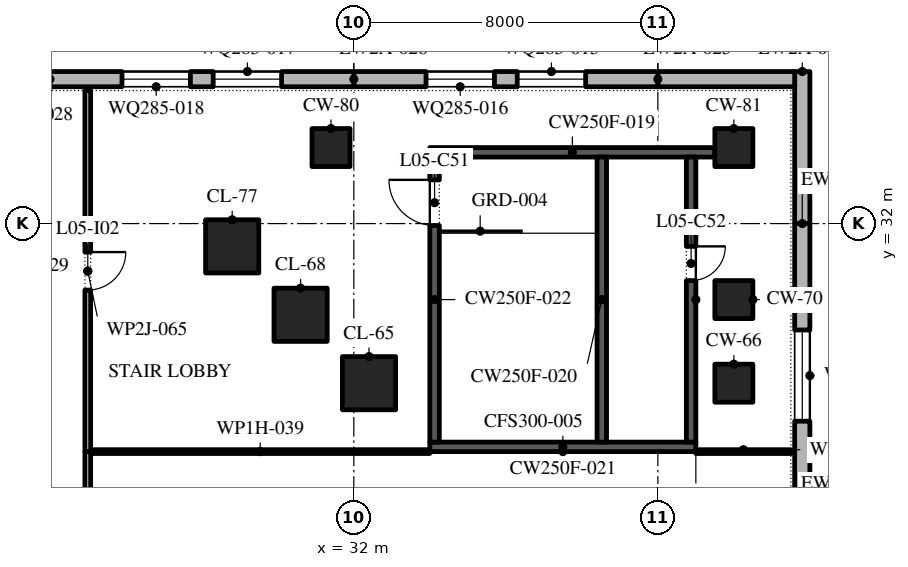
"""IFC4 building model, lengths in metres.
Left out: names, types, materials, properties, quantities, classifications, styles, units other than length and angle.
Written with IfcOpenShell. Run it as: python <this file> out.ifc"""

import sys

from ifc_helpers import new_model, si_unit, direction, frame, frame_2d, origin, origin_2d, place, context, subcontext, project, spatial, polyline, rectangle, outline, extrude, element, fill, save


model = new_model("IFC4")
c1 = context("Model", 3, precision=1e-05, world=origin(), true_north=direction((0.0, 1.0)))
c2 = subcontext(c1, "Body", "Model", "MODEL_VIEW")
j1 = project(units=[si_unit("LENGTHUNIT", "METRE"), si_unit("PLANEANGLEUNIT", "RADIAN")], contexts=[c1])
p1 = place(None, origin())
s1 = spatial("IfcSite", under=j1, at=p1, CompositionType="ELEMENT")
p2 = place(p1, origin())
s2 = spatial("IfcBuilding", under=s1, at=p2, CompositionType="ELEMENT")
p3 = place(p2, frame((0.0, 0.0, 28.8)))
s3 = spatial("IfcBuildingStorey", under=s2, at=p3, CompositionType="ELEMENT", Elevation=28.8)
p4 = place(p3, frame((32.4, 27.8, 0.0), z_axis=(0.0, 0.0, 1.0), x_axis=(1.0, 0.0, 0.0)))
e1 = element("IfcColumn", 1, at=p4, inside=s3, PredefinedType="COLUMN", context=c2, shape_type="SweptSolid", body=[
    extrude(rectangle(XDim=1.4, YDim=1.4, at=origin_2d()), origin(), (0.0, 0.0, 1.0), 4.8),
])
p5 = place(p3, frame((42.0, 27.8, 0.0), z_axis=(0.0, 0.0, 1.0), x_axis=(1.0, 0.0, 0.0)))
e2 = element("IfcColumn", 2, at=p5, inside=s3, PredefinedType="COLUMN", context=c2, shape_type="SweptSolid", body=[
    extrude(rectangle(XDim=1.0, YDim=1.0, at=origin_2d()), origin(), (0.0, 0.0, 1.0), 4.35),
])
p6 = place(p3, frame((30.6, 29.6, 0.0), z_axis=(0.0, 0.0, 1.0), x_axis=(1.0, 0.0, 0.0)))
e3 = element("IfcColumn", 3, at=p6, inside=s3, PredefinedType="COLUMN", context=c2, shape_type="SweptSolid", body=[
    extrude(rectangle(XDim=1.4, YDim=1.4, at=origin_2d()), origin(), (0.0, 0.0, 1.0), 4.8),
])
p7 = place(p3, frame((42.0, 30.0, 0.0), z_axis=(0.0, 0.0, 1.0), x_axis=(1.0, 0.0, 0.0)))
e4 = element("IfcColumn", 4, at=p7, inside=s3, PredefinedType="COLUMN", context=c2, shape_type="SweptSolid", body=[
    extrude(rectangle(XDim=1.0, YDim=1.0, at=origin_2d()), origin(), (0.0, 0.0, 1.0), 4.35),
])
p8 = place(p3, frame((28.8, 31.4, 0.0), z_axis=(0.0, 0.0, 1.0), x_axis=(1.0, 0.0, 0.0)))
e5 = element("IfcColumn", 5, at=p8, inside=s3, PredefinedType="COLUMN", context=c2, shape_type="SweptSolid", body=[
    extrude(rectangle(XDim=1.4, YDim=1.4, at=origin_2d()), origin(), (0.0, 0.0, 1.0), 4.8),
])
for number, where, z_axis, x_axis in (
    (6, (31.4, 34.0, 0.0), (0.0, 0.0, 1.0), (1.0, 0.0, 0.0)),
    (7, (42.0, 34.0, 0.0), (0.0, 0.0, 1.0), (1.0, 0.0, 0.0)),
):
    element("IfcColumn", number, at=place(p3, frame(where, z_axis=z_axis, x_axis=x_axis)), inside=s3, PredefinedType="COLUMN", context=c2, shape_type="SweptSolid", body=[
        extrude(rectangle(XDim=1.0, YDim=1.0, at=origin_2d()), origin(), (0.0, 0.0, 1.0), 4.35),
    ])
p9 = place(p3, frame((43.8, 24.0, 0.0), z_axis=(0.0, 0.0, 1.0), x_axis=(0.0, 1.0, 0.0)))
e8 = element("IfcWall", 8, at=p9, inside=s3, PredefinedType="STANDARD", context=c2, shape_type="SweptSolid", body=[
    extrude(rectangle(XDim=8.0, YDim=0.4, at=frame_2d((4.0, 0.0))), origin(), (0.0, 0.0, 1.0), 4.35),
])
p10 = place(p9, frame((2.8, 0.0, 0.9)))
e9 = element("IfcOpeningElement", 9, at=p10, cuts=e8, PredefinedType="OPENING", context=c2, shape_type="SweptSolid", body=[
    extrude(outline(polyline([(0.0, 0.0), (2.4, 0.0), (2.4, 1.425), (2.378, 1.677), (2.312, 1.921), (2.205, 2.15), (2.06, 2.356), (1.881, 2.535), (1.674, 2.679), (1.444, 2.785), (1.2, 2.85), (0.956, 2.785), (0.726, 2.679), (0.519, 2.535), (0.34, 2.356), (0.195, 2.15), (0.088, 1.921), (0.022, 1.677), (0.0, 1.425), (0.0, 0.0)])), frame((0.0, 0.21, 0.0), z_axis=(0.0, -1.0, 0.0), x_axis=(1.0, 0.0, 0.0)), (0.0, 0.0, 1.0), 0.42),
])
p11 = place(p3, frame((43.8, 32.0, 0.0), z_axis=(0.0, 0.0, 1.0), x_axis=(0.0, 1.0, 0.0)))
e10 = element("IfcWall", 10, at=p11, inside=s3, PredefinedType="STANDARD", context=c2, shape_type="SweptSolid", body=[
    extrude(rectangle(XDim=4.0, YDim=0.4, at=frame_2d((2.0, 0.0))), origin(), (0.0, 0.0, 1.0), 4.35),
])
p12 = place(p3, frame((43.6, 35.8, 0.0), z_axis=(0.0, 0.0, 1.0), x_axis=(-1.0, 0.0, 0.0)))
e11 = element("IfcWall", 11, at=p12, inside=s3, PredefinedType="STANDARD", context=c2, shape_type="SweptSolid", body=[
    extrude(rectangle(XDim=3.6, YDim=0.4, at=frame_2d((1.8, 0.0))), origin(), (0.0, 0.0, 1.0), 4.35),
])
p13 = place(p3, frame((40.0, 35.8, 0.0), z_axis=(0.0, 0.0, 1.0), x_axis=(-1.0, 0.0, 0.0)))
e12 = element("IfcWall", 12, at=p13, inside=s3, PredefinedType="STANDARD", context=c2, shape_type="SweptSolid", body=[
    extrude(rectangle(XDim=8.0, YDim=0.4, at=frame_2d((4.0, 0.0))), origin(), (0.0, 0.0, 1.0), 4.35),
])
p14 = place(p13, frame((1.9, 0.0, 0.9)))
e13 = element("IfcOpeningElement", 13, at=p14, cuts=e12, PredefinedType="OPENING", context=c2, shape_type="SweptSolid", body=[
    extrude(outline(polyline([(0.0, 0.0), (1.8, 0.0), (1.8, 1.425), (1.784, 1.646), (1.738, 1.864), (1.661, 2.072), (1.556, 2.268), (1.425, 2.447), (1.269, 2.605), (1.093, 2.741), (0.9, 2.85), (0.707, 2.741), (0.531, 2.605), (0.375, 2.447), (0.244, 2.268), (0.139, 2.072), (0.062, 1.864), (0.016, 1.646), (0.0, 1.425), (0.0, 0.0)])), frame((0.0, 0.21, 0.0), z_axis=(0.0, -1.0, 0.0), x_axis=(1.0, 0.0, 0.0)), (0.0, 0.0, 1.0), 0.42),
])
p15 = place(p13, frame((4.3, 0.0, 0.9)))
e14 = element("IfcOpeningElement", 14, at=p15, cuts=e12, PredefinedType="OPENING", context=c2, shape_type="SweptSolid", body=[
    extrude(outline(polyline([(0.0, 0.0), (1.8, 0.0), (1.8, 1.425), (1.784, 1.646), (1.738, 1.864), (1.661, 2.072), (1.556, 2.268), (1.425, 2.447), (1.269, 2.605), (1.093, 2.741), (0.9, 2.85), (0.707, 2.741), (0.531, 2.605), (0.375, 2.447), (0.244, 2.268), (0.139, 2.072), (0.062, 1.864), (0.016, 1.646), (0.0, 1.425), (0.0, 0.0)])), frame((0.0, 0.21, 0.0), z_axis=(0.0, -1.0, 0.0), x_axis=(1.0, 0.0, 0.0)), (0.0, 0.0, 1.0), 0.42),
])
p16 = place(p3, frame((32.0, 35.8, 0.0), z_axis=(0.0, 0.0, 1.0), x_axis=(-1.0, 0.0, 0.0)))
e15 = element("IfcWall", 15, at=p16, inside=s3, PredefinedType="STANDARD", context=c2, shape_type="SweptSolid", body=[
    extrude(rectangle(XDim=8.0, YDim=0.4, at=frame_2d((4.0, 0.0))), origin(), (0.0, 0.0, 1.0), 4.35),
])
p17 = place(p16, frame((1.9, 0.0, 0.9)))
e16 = element("IfcOpeningElement", 16, at=p17, cuts=e15, PredefinedType="OPENING", context=c2, shape_type="SweptSolid", body=[
    extrude(outline(polyline([(0.0, 0.0), (1.8, 0.0), (1.8, 1.425), (1.784, 1.646), (1.738, 1.864), (1.661, 2.072), (1.556, 2.268), (1.425, 2.447), (1.269, 2.605), (1.093, 2.741), (0.9, 2.85), (0.707, 2.741), (0.531, 2.605), (0.375, 2.447), (0.244, 2.268), (0.139, 2.072), (0.062, 1.864), (0.016, 1.646), (0.0, 1.425), (0.0, 0.0)])), frame((0.0, 0.21, 0.0), z_axis=(0.0, -1.0, 0.0), x_axis=(1.0, 0.0, 0.0)), (0.0, 0.0, 1.0), 0.42),
])
p18 = place(p16, frame((4.3, 0.0, 0.9)))
e17 = element("IfcOpeningElement", 17, at=p18, cuts=e15, PredefinedType="OPENING", context=c2, shape_type="SweptSolid", body=[
    extrude(outline(polyline([(0.0, 0.0), (1.8, 0.0), (1.8, 1.425), (1.784, 1.646), (1.738, 1.864), (1.661, 2.072), (1.556, 2.268), (1.425, 2.447), (1.269, 2.605), (1.093, 2.741), (0.9, 2.85), (0.707, 2.741), (0.531, 2.605), (0.375, 2.447), (0.244, 2.268), (0.139, 2.072), (0.062, 1.864), (0.016, 1.646), (0.0, 1.425), (0.0, 0.0)])), frame((0.0, 0.21, 0.0), z_axis=(0.0, -1.0, 0.0), x_axis=(1.0, 0.0, 0.0)), (0.0, 0.0, 1.0), 0.42),
])
p19 = place(p3, frame((34.0, 26.125, 0.0), z_axis=(0.0, 0.0, 1.0), x_axis=(1.0, 0.0, 0.0)))
e18 = element("IfcWall", 18, at=p19, inside=s3, PredefinedType="SHEAR", context=c2, shape_type="SweptSolid", body=[
    extrude(rectangle(XDim=7.0, YDim=0.25, at=frame_2d((3.5, 0.0))), origin(), (0.0, 0.0, 1.0), 4.35),
])
p20 = place(p3, frame((34.0, 33.875, 0.0), z_axis=(0.0, 0.0, 1.0), x_axis=(1.0, 0.0, 0.0)))
e19 = element("IfcWall", 19, at=p20, inside=s3, PredefinedType="SHEAR", context=c2, shape_type="SweptSolid", body=[
    extrude(rectangle(XDim=7.5, YDim=0.25, at=frame_2d((3.75, 0.0))), origin(), (0.0, 0.0, 1.0), 4.35),
])
p21 = place(p3, frame((34.125, 26.25, 0.0), z_axis=(0.0, 0.0, 1.0), x_axis=(0.0, 1.0, 0.0)))
e20 = element("IfcWall", 20, at=p21, inside=s3, PredefinedType="SHEAR", context=c2, shape_type="SweptSolid", body=[
    extrude(rectangle(XDim=7.5, YDim=0.25, at=frame_2d((3.75, 0.0))), origin(), (0.0, 0.0, 1.0), 4.35),
])
p22 = place(p21, frame((5.7, 0.0, 0.0)))
e21 = element("IfcOpeningElement", 21, at=p22, cuts=e20, PredefinedType="OPENING", context=c2, shape_type="SweptSolid", body=[
    extrude(rectangle(XDim=1.2, YDim=2.1, at=frame_2d((0.6, 1.05))), frame((0.0, 0.135, 0.0), z_axis=(0.0, -1.0, 0.0), x_axis=(1.0, 0.0, 0.0)), (0.0, 0.0, 1.0), 0.27),
])
p23 = place(p3, frame((40.875, 26.25, 0.0), z_axis=(0.0, 0.0, 1.0), x_axis=(0.0, 1.0, 0.0)))
e22 = element("IfcWall", 22, at=p23, inside=s3, PredefinedType="SHEAR", context=c2, shape_type="SweptSolid", body=[
    extrude(rectangle(XDim=7.5, YDim=0.25, at=frame_2d((3.75, 0.0))), origin(), (0.0, 0.0, 1.0), 4.35),
])
p24 = place(p23, frame((4.25, 0.0, 0.0)))
e23 = element("IfcOpeningElement", 23, at=p24, cuts=e22, PredefinedType="OPENING", context=c2, shape_type="SweptSolid", body=[
    extrude(rectangle(XDim=0.9, YDim=2.1, at=frame_2d((0.45, 1.05))), frame((0.0, 0.135, 0.0), z_axis=(0.0, -1.0, 0.0), x_axis=(1.0, 0.0, 0.0)), (0.0, 0.0, 1.0), 0.27),
])
p25 = place(p3, frame((38.525, 26.25, 0.0), z_axis=(0.0, 0.0, 1.0), x_axis=(0.0, 1.0, 0.0)))
e24 = element("IfcWall", 24, at=p25, inside=s3, PredefinedType="SHEAR", context=c2, shape_type="SweptSolid", body=[
    extrude(rectangle(XDim=7.5, YDim=0.25, at=frame_2d((3.75, 0.0))), origin(), (0.0, 0.0, 1.0), 4.35),
])
p26 = place(p3, frame((25.075, 26.0, 0.0), z_axis=(0.0, 0.0, 1.0), x_axis=(1.0, 0.0, 0.0)))
e25 = element("IfcWall", 25, at=p26, inside=s3, PredefinedType="PARTITIONING", context=c2, shape_type="SweptSolid", body=[
    extrude(rectangle(XDim=8.925, YDim=0.1, at=frame_2d((4.462, 0.0))), origin(), (0.0, 0.0, 1.0), 4.35),
])
p27 = place(p3, frame((41.0, 26.0, 0.0), z_axis=(0.0, 0.0, 1.0), x_axis=(1.0, 0.0, 0.0)))
e26 = element("IfcWall", 26, at=p27, inside=s3, PredefinedType="PARTITIONING", context=c2, shape_type="SweptSolid", body=[
    extrude(rectangle(XDim=2.5, YDim=0.1, at=frame_2d((1.25, 0.0))), origin(), (0.0, 0.0, 1.0), 4.35),
])
p28 = place(p3, frame((25.0, 12.5, 0.0), z_axis=(0.0, 0.0, 1.0), x_axis=(0.0, 1.0, 0.0)))
e27 = element("IfcWall", 27, at=p28, inside=s3, PredefinedType="PARTITIONING", context=c2, shape_type="SweptSolid", body=[
    extrude(rectangle(XDim=13.5, YDim=0.15, at=frame_2d((6.75, 0.0))), origin(), (0.0, 0.0, 1.0), 4.35),
])
p29 = place(p28, frame((5.85, 0.0, 0.0)))
e28 = element("IfcOpeningElement", 28, at=p29, cuts=e27, PredefinedType="OPENING", context=c2, shape_type="SweptSolid", body=[
    extrude(rectangle(XDim=1.8, YDim=2.1, at=frame_2d((0.9, 1.05))), frame((0.0, 0.085, 0.0), z_axis=(0.0, -1.0, 0.0), x_axis=(1.0, 0.0, 0.0)), (0.0, 0.0, 1.0), 0.17),
])
p30 = place(p3, frame((25.0, 26.0, 0.0), z_axis=(0.0, 0.0, 1.0), x_axis=(0.0, 1.0, 0.0)))
e29 = element("IfcWall", 29, at=p30, inside=s3, PredefinedType="PARTITIONING", context=c2, shape_type="SweptSolid", body=[
    extrude(rectangle(XDim=9.5, YDim=0.15, at=frame_2d((4.75, 0.0))), origin(), (0.0, 0.0, 1.0), 4.35),
])
p31 = place(p30, frame((4.25, 0.0, 0.0)))
e30 = element("IfcOpeningElement", 30, at=p31, cuts=e29, PredefinedType="OPENING", context=c2, shape_type="SweptSolid", body=[
    extrude(rectangle(XDim=1.0, YDim=2.1, at=frame_2d((0.5, 1.05))), frame((0.0, 0.085, 0.0), z_axis=(0.0, -1.0, 0.0), x_axis=(1.0, 0.0, 0.0)), (0.0, 0.0, 1.0), 0.17),
])
p32 = place(p10, origin())
e31 = element("IfcWindow", 31, at=p32, inside=s3, PartitioningType="DOUBLE_PANEL_VERTICAL", PredefinedType="WINDOW", context=c2, shape_type="SweptSolid", body=[
    extrude(outline(polyline([(0.0, 0.0), (2.4, 0.0), (2.4, 1.425), (2.378, 1.677), (2.312, 1.921), (2.205, 2.15), (2.06, 2.356), (1.881, 2.535), (1.674, 2.679), (1.444, 2.785), (1.2, 2.85), (0.956, 2.785), (0.726, 2.679), (0.519, 2.535), (0.34, 2.356), (0.195, 2.15), (0.088, 1.921), (0.022, 1.677), (0.0, 1.425), (0.0, 0.0)])), frame((0.0, 0.03, 0.0), z_axis=(0.0, -1.0, 0.0), x_axis=(1.0, 0.0, 0.0)), (0.0, 0.0, 1.0), 0.06),
])
fill(e9, e31)
p33 = place(p14, origin())
e32 = element("IfcWindow", 32, at=p33, inside=s3, PartitioningType="DOUBLE_PANEL_VERTICAL", PredefinedType="WINDOW", context=c2, shape_type="SweptSolid", body=[
    extrude(outline(polyline([(0.0, 0.0), (1.8, 0.0), (1.8, 1.425), (1.784, 1.646), (1.738, 1.864), (1.661, 2.072), (1.556, 2.268), (1.425, 2.447), (1.269, 2.605), (1.093, 2.741), (0.9, 2.85), (0.707, 2.741), (0.531, 2.605), (0.375, 2.447), (0.244, 2.268), (0.139, 2.072), (0.062, 1.864), (0.016, 1.646), (0.0, 1.425), (0.0, 0.0)])), frame((0.0, 0.03, 0.0), z_axis=(0.0, -1.0, 0.0), x_axis=(1.0, 0.0, 0.0)), (0.0, 0.0, 1.0), 0.06),
])
fill(e13, e32)
p34 = place(p15, origin())
e33 = element("IfcWindow", 33, at=p34, inside=s3, PartitioningType="DOUBLE_PANEL_VERTICAL", PredefinedType="WINDOW", context=c2, shape_type="SweptSolid", body=[
    extrude(outline(polyline([(0.0, 0.0), (1.8, 0.0), (1.8, 1.425), (1.784, 1.646), (1.738, 1.864), (1.661, 2.072), (1.556, 2.268), (1.425, 2.447), (1.269, 2.605), (1.093, 2.741), (0.9, 2.85), (0.707, 2.741), (0.531, 2.605), (0.375, 2.447), (0.244, 2.268), (0.139, 2.072), (0.062, 1.864), (0.016, 1.646), (0.0, 1.425), (0.0, 0.0)])), frame((0.0, 0.03, 0.0), z_axis=(0.0, -1.0, 0.0), x_axis=(1.0, 0.0, 0.0)), (0.0, 0.0, 1.0), 0.06),
])
fill(e14, e33)
p35 = place(p17, origin())
e34 = element("IfcWindow", 34, at=p35, inside=s3, PartitioningType="DOUBLE_PANEL_VERTICAL", PredefinedType="WINDOW", context=c2, shape_type="SweptSolid", body=[
    extrude(outline(polyline([(0.0, 0.0), (1.8, 0.0), (1.8, 1.425), (1.784, 1.646), (1.738, 1.864), (1.661, 2.072), (1.556, 2.268), (1.425, 2.447), (1.269, 2.605), (1.093, 2.741), (0.9, 2.85), (0.707, 2.741), (0.531, 2.605), (0.375, 2.447), (0.244, 2.268), (0.139, 2.072), (0.062, 1.864), (0.016, 1.646), (0.0, 1.425), (0.0, 0.0)])), frame((0.0, 0.03, 0.0), z_axis=(0.0, -1.0, 0.0), x_axis=(1.0, 0.0, 0.0)), (0.0, 0.0, 1.0), 0.06),
])
fill(e16, e34)
p36 = place(p18, origin())
e35 = element("IfcWindow", 35, at=p36, inside=s3, PartitioningType="DOUBLE_PANEL_VERTICAL", PredefinedType="WINDOW", context=c2, shape_type="SweptSolid", body=[
    extrude(outline(polyline([(0.0, 0.0), (1.8, 0.0), (1.8, 1.425), (1.784, 1.646), (1.738, 1.864), (1.661, 2.072), (1.556, 2.268), (1.425, 2.447), (1.269, 2.605), (1.093, 2.741), (0.9, 2.85), (0.707, 2.741), (0.531, 2.605), (0.375, 2.447), (0.244, 2.268), (0.139, 2.072), (0.062, 1.864), (0.016, 1.646), (0.0, 1.425), (0.0, 0.0)])), frame((0.0, 0.03, 0.0), z_axis=(0.0, -1.0, 0.0), x_axis=(1.0, 0.0, 0.0)), (0.0, 0.0, 1.0), 0.06),
])
fill(e17, e35)
p37 = place(p22, origin())
e36 = element("IfcDoor", 36, at=p37, inside=s3, OperationType="SINGLE_SWING_LEFT", PredefinedType="DOOR", context=c2, shape_type="SweptSolid", body=[
    extrude(rectangle(XDim=1.2, YDim=2.1, at=frame_2d((0.6, 1.05))), frame((0.0, 0.025, 0.0), z_axis=(0.0, -1.0, 0.0), x_axis=(1.0, 0.0, 0.0)), (0.0, 0.0, 1.0), 0.05),
])
fill(e21, e36)
p38 = place(p24, frame((0.9, 0.2, 0.0), z_axis=(0.0, 0.0, 1.0), x_axis=(-1.0, 0.0, 0.0)))
e37 = element("IfcDoor", 37, at=p38, inside=s3, OperationType="SINGLE_SWING_RIGHT", PredefinedType="DOOR", context=c2, shape_type="SweptSolid", body=[
    extrude(rectangle(XDim=0.9, YDim=2.1, at=frame_2d((0.45, 1.05))), frame((0.0, 0.125, 0.0), z_axis=(0.0, -1.0, 0.0), x_axis=(1.0, 0.0, 0.0)), (0.0, 0.0, 1.0), 0.05),
])
fill(e23, e37)
p39 = place(p31, frame((1.0, 0.0, 0.0), z_axis=(0.0, 0.0, 1.0), x_axis=(-1.0, 0.0, 0.0)))
e38 = element("IfcDoor", 38, at=p39, inside=s3, OperationType="SINGLE_SWING_RIGHT", PredefinedType="DOOR", context=c2, shape_type="SweptSolid", body=[
    extrude(rectangle(XDim=1.0, YDim=2.1, at=frame_2d((0.5, 1.05))), frame((0.0, 0.025, 0.0), z_axis=(0.0, -1.0, 0.0), x_axis=(1.0, 0.0, 0.0)), (0.0, 0.0, 1.0), 0.05),
])
fill(e30, e38)
save(model, sys.argv[1])
